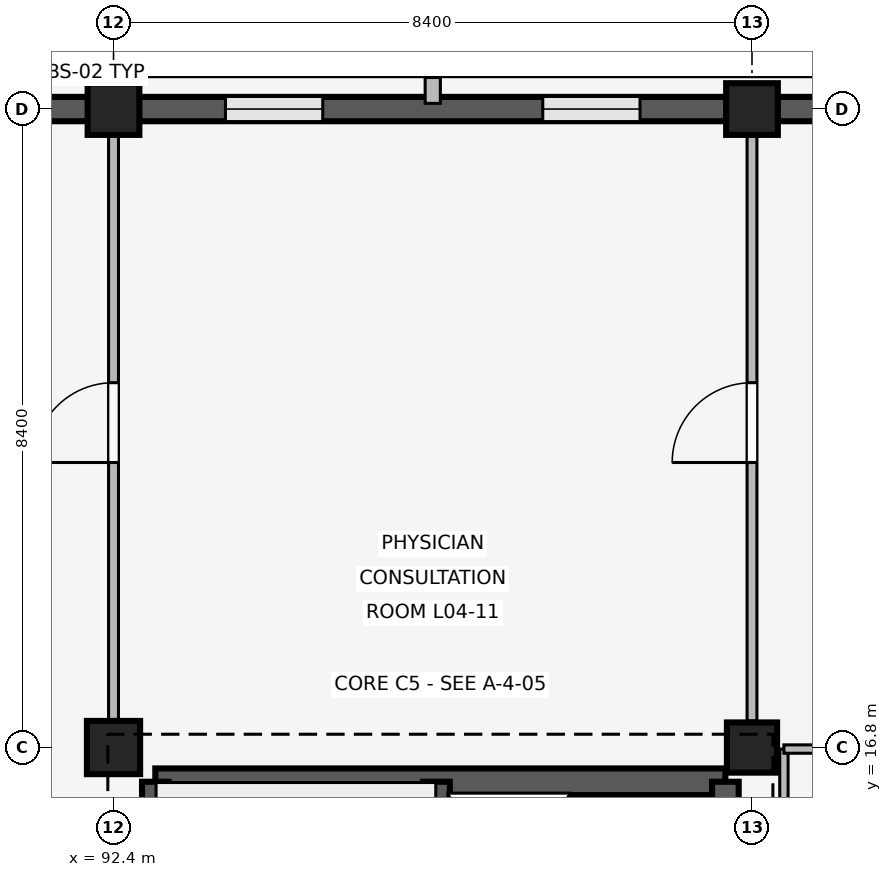
"""IFC4 building model, lengths in metres.
Left out: names, types, materials, properties, quantities, classifications, styles, units other than length and angle.
Written with IfcOpenShell. Run it as: python <this file> out.ifc"""

import sys

from ifc_helpers import new_model, si_unit, direction, frame, frame_2d, origin, origin_2d, place, context, subcontext, project, spatial, rectangle, extrude, element, fill, save


model = new_model("IFC4")
c1 = context("Model", 3, precision=1e-05, world=origin(), true_north=direction((0.0, 1.0)))
c2 = subcontext(c1, "Body", "Model", "MODEL_VIEW")
j1 = project(units=[si_unit("LENGTHUNIT", "METRE"), si_unit("PLANEANGLEUNIT", "RADIAN")], contexts=[c1])
p1 = place(None, origin())
s1 = spatial("IfcSite", under=j1, at=p1, CompositionType="ELEMENT")
p2 = place(p1, origin())
s2 = spatial("IfcBuilding", under=s1, at=p2, CompositionType="ELEMENT")
p3 = place(p2, frame((0.0, 0.0, 16.2)))
s3 = spatial("IfcBuildingStorey", under=s2, at=p3, CompositionType="ELEMENT", Elevation=16.2)
p4 = place(p3, frame((92.4, 16.8, 0.0), z_axis=(0.0, 0.0, 1.0), x_axis=(1.0, 0.0, 0.0)))
e1 = element("IfcColumn", 1, at=p4, inside=s3, PredefinedType="COLUMN", context=c2, shape_type="SweptSolid", body=[
    extrude(rectangle(XDim=0.7, YDim=0.7, at=origin_2d()), origin(), (0.0, 0.0, 1.0), 4.2),
])
p5 = place(p3, frame((92.4, 25.2, 0.0), z_axis=(0.0, 0.0, 1.0), x_axis=(1.0, 0.0, 0.0)))
e2 = element("IfcColumn", 2, at=p5, inside=s3, PredefinedType="COLUMN", context=c2, shape_type="SweptSolid", body=[
    extrude(rectangle(XDim=0.68, YDim=0.68, at=origin_2d()), origin(), (0.0, 0.0, 1.0), 4.2),
])
p6 = place(p3, frame((100.8, 16.8, 0.0), z_axis=(0.0, 0.0, 1.0), x_axis=(1.0, 0.0, 0.0)))
e3 = element("IfcColumn", 3, at=p6, inside=s3, PredefinedType="COLUMN", context=c2, shape_type="SweptSolid", body=[
    extrude(rectangle(XDim=0.66, YDim=0.66, at=origin_2d()), origin(), (0.0, 0.0, 1.0), 4.2),
])
p7 = place(p3, frame((100.8, 25.2, 0.0), z_axis=(0.0, 0.0, 1.0), x_axis=(1.0, 0.0, 0.0)))
e4 = element("IfcColumn", 4, at=p7, inside=s3, PredefinedType="COLUMN", context=c2, shape_type="SweptSolid", body=[
    extrude(rectangle(XDim=0.68, YDim=0.68, at=origin_2d()), origin(), (0.0, 0.0, 1.0), 4.2),
])
p8 = place(p3, frame((84.335, 25.2, 0.0), z_axis=(0.0, 0.0, 1.0), x_axis=(1.0, 0.0, 0.0)))
e5 = element("IfcWall", 5, at=p8, inside=s3, PredefinedType="SOLIDWALL", context=c2, shape_type="SweptSolid", body=[
    extrude(rectangle(XDim=7.73, YDim=0.32, at=frame_2d((3.865, 0.0))), origin(), (0.0, 0.0, 1.0), 3.32),
])
p9 = place(p8, frame((1.098, 0.0, 0.85)))
e6 = element("IfcOpeningElement", 6, at=p9, cuts=e5, PredefinedType="OPENING", context=c2, shape_type="SweptSolid", body=[
    extrude(rectangle(XDim=1.36, YDim=1.42, at=frame_2d((0.68, 0.71))), frame((0.0, 0.17, 0.0), z_axis=(0.0, -1.0, 0.0), x_axis=(1.0, 0.0, 0.0)), (0.0, 0.0, 1.0), 0.34),
])
p10 = place(p8, frame((5.272, 0.0, 0.85)))
e7 = element("IfcOpeningElement", 7, at=p10, cuts=e5, PredefinedType="OPENING", context=c2, shape_type="SweptSolid", body=[
    extrude(rectangle(XDim=1.36, YDim=1.42, at=frame_2d((0.68, 0.71))), frame((0.0, 0.17, 0.0), z_axis=(0.0, -1.0, 0.0), x_axis=(1.0, 0.0, 0.0)), (0.0, 0.0, 1.0), 0.34),
])
p11 = place(p3, frame((92.735, 25.2, 0.0), z_axis=(0.0, 0.0, 1.0), x_axis=(1.0, 0.0, 0.0)))
e8 = element("IfcWall", 8, at=p11, inside=s3, PredefinedType="SOLIDWALL", context=c2, shape_type="SweptSolid", body=[
    extrude(rectangle(XDim=7.73, YDim=0.32, at=frame_2d((3.865, 0.0))), origin(), (0.0, 0.0, 1.0), 3.32),
])
p12 = place(p11, frame((1.138, 0.0, 0.85)))
e9 = element("IfcOpeningElement", 9, at=p12, cuts=e8, PredefinedType="OPENING", context=c2, shape_type="SweptSolid", body=[
    extrude(rectangle(XDim=1.28, YDim=1.38, at=frame_2d((0.64, 0.69))), frame((0.0, 0.17, 0.0), z_axis=(0.0, -1.0, 0.0), x_axis=(1.0, 0.0, 0.0)), (0.0, 0.0, 1.0), 0.34),
])
p13 = place(p11, frame((5.312, 0.0, 0.85)))
e10 = element("IfcOpeningElement", 10, at=p13, cuts=e8, PredefinedType="OPENING", context=c2, shape_type="SweptSolid", body=[
    extrude(rectangle(XDim=1.28, YDim=1.38, at=frame_2d((0.64, 0.69))), frame((0.0, 0.17, 0.0), z_axis=(0.0, -1.0, 0.0), x_axis=(1.0, 0.0, 0.0)), (0.0, 0.0, 1.0), 0.34),
])
p14 = place(p3, frame((96.6, 25.275, 0.0), z_axis=(0.0, 0.0, 1.0), x_axis=(0.0, 1.0, 0.0)))
e11 = element("IfcWall", 11, at=p14, inside=s3, PredefinedType="ELEMENTEDWALL", context=c2, shape_type="SweptSolid", body=[
    extrude(rectangle(XDim=0.34, YDim=0.2, at=frame_2d((0.17, 0.0))), origin(), (0.0, 0.0, 1.0), 3.3),
])
p15 = place(p3, frame((101.135, 25.2, 0.0), z_axis=(0.0, 0.0, 1.0), x_axis=(1.0, 0.0, 0.0)))
e12 = element("IfcWall", 12, at=p15, inside=s3, PredefinedType="SOLIDWALL", context=c2, shape_type="SweptSolid", body=[
    extrude(rectangle(XDim=7.73, YDim=0.32, at=frame_2d((3.865, 0.0))), origin(), (0.0, 0.0, 1.0), 3.32),
])
p16 = place(p15, frame((1.158, 0.0, 0.85)))
e13 = element("IfcOpeningElement", 13, at=p16, cuts=e12, PredefinedType="OPENING", context=c2, shape_type="SweptSolid", body=[
    extrude(rectangle(XDim=1.24, YDim=1.34, at=frame_2d((0.62, 0.67))), frame((0.0, 0.17, 0.0), z_axis=(0.0, -1.0, 0.0), x_axis=(1.0, 0.0, 0.0)), (0.0, 0.0, 1.0), 0.34),
])
p17 = place(p15, frame((5.332, 0.0, 0.85)))
e14 = element("IfcOpeningElement", 14, at=p17, cuts=e12, PredefinedType="OPENING", context=c2, shape_type="SweptSolid", body=[
    extrude(rectangle(XDim=1.24, YDim=1.34, at=frame_2d((0.62, 0.67))), frame((0.0, 0.17, 0.0), z_axis=(0.0, -1.0, 0.0), x_axis=(1.0, 0.0, 0.0)), (0.0, 0.0, 1.0), 0.34),
])
p18 = place(p3, frame((92.95, 16.35, 0.0), z_axis=(0.0, 0.0, 1.0), x_axis=(1.0, 0.0, 0.0)))
e15 = element("IfcWall", 15, at=p18, inside=s3, PredefinedType="SHEAR", context=c2, shape_type="SweptSolid", body=[
    extrude(rectangle(XDim=7.5, YDim=0.35, at=frame_2d((3.75, 0.0))), origin(), (0.0, 0.0, 1.0), 3.92),
])
p19 = place(p3, frame((92.95, 8.8, 0.0), z_axis=(0.0, 0.0, 1.0), x_axis=(0.0, 1.0, 0.0)))
e16 = element("IfcWall", 16, at=p19, inside=s3, PredefinedType="SHEAR", context=c2, shape_type="SweptSolid", body=[
    extrude(rectangle(XDim=7.55, YDim=0.35, at=frame_2d((3.775, 0.0))), origin(), (0.0, 0.0, 1.0), 3.92),
])
p20 = place(p19, frame((0.28, 0.0, 0.0)))
e17 = element("IfcOpeningElement", 17, at=p20, cuts=e16, PredefinedType="OPENING", context=c2, shape_type="SweptSolid", body=[
    extrude(rectangle(XDim=1.0, YDim=2.15, at=frame_2d((0.5, 1.075))), frame((0.0, 0.185, 0.0), z_axis=(0.0, -1.0, 0.0), x_axis=(1.0, 0.0, 0.0)), (0.0, 0.0, 1.0), 0.37),
])
p21 = place(p3, frame((100.45, 8.8, 0.0), z_axis=(0.0, 0.0, 1.0), x_axis=(0.0, 1.0, 0.0)))
e18 = element("IfcWall", 18, at=p21, inside=s3, PredefinedType="SHEAR", context=c2, shape_type="SweptSolid", body=[
    extrude(rectangle(XDim=7.55, YDim=0.35, at=frame_2d((3.775, 0.0))), origin(), (0.0, 0.0, 1.0), 3.92),
])
p22 = place(p21, frame((2.4, 0.0, 0.0)))
e19 = element("IfcOpeningElement", 19, at=p22, cuts=e18, PredefinedType="OPENING", context=c2, shape_type="SweptSolid", body=[
    extrude(rectangle(XDim=1.2, YDim=2.2, at=frame_2d((0.6, 1.1))), frame((0.0, 0.185, 0.0), z_axis=(0.0, -1.0, 0.0), x_axis=(1.0, 0.0, 0.0)), (0.0, 0.0, 1.0), 0.37),
])
p23 = place(p3, frame((96.65, 8.8, 0.0), z_axis=(0.0, 0.0, 1.0), x_axis=(0.0, 1.0, 0.0)))
e20 = element("IfcWall", 20, at=p23, inside=s3, PredefinedType="SHEAR", context=c2, shape_type="SweptSolid", body=[
    extrude(rectangle(XDim=7.55, YDim=0.35, at=frame_2d((3.775, 0.0))), origin(), (0.0, 0.0, 1.0), 3.92),
])
p24 = place(p23, frame((0.28, 0.0, 0.0)))
e21 = element("IfcOpeningElement", 21, at=p24, cuts=e20, PredefinedType="OPENING", context=c2, shape_type="SweptSolid", body=[
    extrude(rectangle(XDim=1.0, YDim=2.15, at=frame_2d((0.5, 1.075))), frame((0.0, 0.185, 0.0), z_axis=(0.0, -1.0, 0.0), x_axis=(1.0, 0.0, 0.0)), (0.0, 0.0, 1.0), 0.37),
])
p25 = place(p3, frame((92.4, 17.15, 0.0), z_axis=(0.0, 0.0, 1.0), x_axis=(0.0, 1.0, 0.0)))
e22 = element("IfcWall", 22, at=p25, inside=s3, PredefinedType="PARTITIONING", context=c2, shape_type="SweptSolid", body=[
    extrude(rectangle(XDim=7.91, YDim=0.13, at=frame_2d((3.955, 0.0))), origin(), (0.0, 0.0, 1.0), 3.3),
])
p26 = place(p25, frame((3.4, 0.0, 0.0)))
e23 = element("IfcOpeningElement", 23, at=p26, cuts=e22, PredefinedType="OPENING", context=c2, shape_type="SweptSolid", body=[
    extrude(rectangle(XDim=1.05, YDim=2.2, at=frame_2d((0.525, 1.1))), frame((0.0, 0.075, 0.0), z_axis=(0.0, -1.0, 0.0), x_axis=(1.0, 0.0, 0.0)), (0.0, 0.0, 1.0), 0.15),
])
p27 = place(p3, frame((100.8, 17.15, 0.0), z_axis=(0.0, 0.0, 1.0), x_axis=(0.0, 1.0, 0.0)))
e24 = element("IfcWall", 24, at=p27, inside=s3, PredefinedType="PARTITIONING", context=c2, shape_type="SweptSolid", body=[
    extrude(rectangle(XDim=7.91, YDim=0.13, at=frame_2d((3.955, 0.0))), origin(), (0.0, 0.0, 1.0), 3.3),
])
p28 = place(p27, frame((3.4, 0.0, 0.0)))
e25 = element("IfcOpeningElement", 25, at=p28, cuts=e24, PredefinedType="OPENING", context=c2, shape_type="SweptSolid", body=[
    extrude(rectangle(XDim=1.05, YDim=2.2, at=frame_2d((0.525, 1.1))), frame((0.0, 0.075, 0.0), z_axis=(0.0, -1.0, 0.0), x_axis=(1.0, 0.0, 0.0)), (0.0, 0.0, 1.0), 0.15),
])
p29 = place(p3, frame((101.22, 14.17, 0.0), z_axis=(0.0, 0.0, 1.0), x_axis=(0.0, 1.0, 0.0)))
e26 = element("IfcWall", 26, at=p29, inside=s3, PredefinedType="PARTITIONING", context=c2, shape_type="SweptSolid", body=[
    extrude(rectangle(XDim=2.61, YDim=0.11, at=frame_2d((1.305, 0.0))), origin(), (0.0, 0.0, 1.0), 3.3),
])
p30 = place(p3, frame((101.22, 16.78, 0.0), z_axis=(0.0, 0.0, 1.0), x_axis=(1.0, 0.0, 0.0)))
e27 = element("IfcWall", 27, at=p30, inside=s3, PredefinedType="PARTITIONING", context=c2, shape_type="SweptSolid", body=[
    extrude(rectangle(XDim=1.98, YDim=0.11, at=frame_2d((0.99, 0.0))), origin(), (0.0, 0.0, 1.0), 3.3),
])
p31 = place(p30, frame((0.54, 0.0, 0.0)))
e28 = element("IfcOpeningElement", 28, at=p31, cuts=e27, PredefinedType="OPENING", context=c2, shape_type="SweptSolid", body=[
    extrude(rectangle(XDim=0.9, YDim=2.1, at=frame_2d((0.45, 1.05))), frame((0.0, 0.065, 0.0), z_axis=(0.0, -1.0, 0.0), x_axis=(1.0, 0.0, 0.0)), (0.0, 0.0, 1.0), 0.13),
])
p32 = place(p12, origin())
e29 = element("IfcWindow", 29, at=p32, inside=s3, PartitioningType="SINGLE_PANEL", PredefinedType="WINDOW", context=c2, shape_type="SweptSolid", body=[
    extrude(rectangle(XDim=1.28, YDim=1.38, at=frame_2d((0.64, 0.69))), frame((0.0, 0.03, 0.0), z_axis=(0.0, -1.0, 0.0), x_axis=(1.0, 0.0, 0.0)), (0.0, 0.0, 1.0), 0.06),
])
fill(e9, e29)
p33 = place(p13, origin())
e30 = element("IfcWindow", 30, at=p33, inside=s3, PartitioningType="SINGLE_PANEL", PredefinedType="WINDOW", context=c2, shape_type="SweptSolid", body=[
    extrude(rectangle(XDim=1.28, YDim=1.38, at=frame_2d((0.64, 0.69))), frame((0.0, 0.03, 0.0), z_axis=(0.0, -1.0, 0.0), x_axis=(1.0, 0.0, 0.0)), (0.0, 0.0, 1.0), 0.06),
])
fill(e10, e30)
p34 = place(p26, origin())
e31 = element("IfcDoor", 31, at=p34, inside=s3, OperationType="SINGLE_SWING_LEFT", PredefinedType="DOOR", context=c2, shape_type="SweptSolid", body=[
    extrude(rectangle(XDim=1.05, YDim=2.2, at=frame_2d((0.525, 1.1))), frame((0.0, 0.025, 0.0), z_axis=(0.0, -1.0, 0.0), x_axis=(1.0, 0.0, 0.0)), (0.0, 0.0, 1.0), 0.05),
])
fill(e23, e31)
p35 = place(p28, origin())
e32 = element("IfcDoor", 32, at=p35, inside=s3, OperationType="SINGLE_SWING_LEFT", PredefinedType="DOOR", context=c2, shape_type="SweptSolid", body=[
    extrude(rectangle(XDim=1.05, YDim=2.2, at=frame_2d((0.525, 1.1))), frame((0.0, 0.025, 0.0), z_axis=(0.0, -1.0, 0.0), x_axis=(1.0, 0.0, 0.0)), (0.0, 0.0, 1.0), 0.05),
])
fill(e25, e32)
save(model, sys.argv[1])
